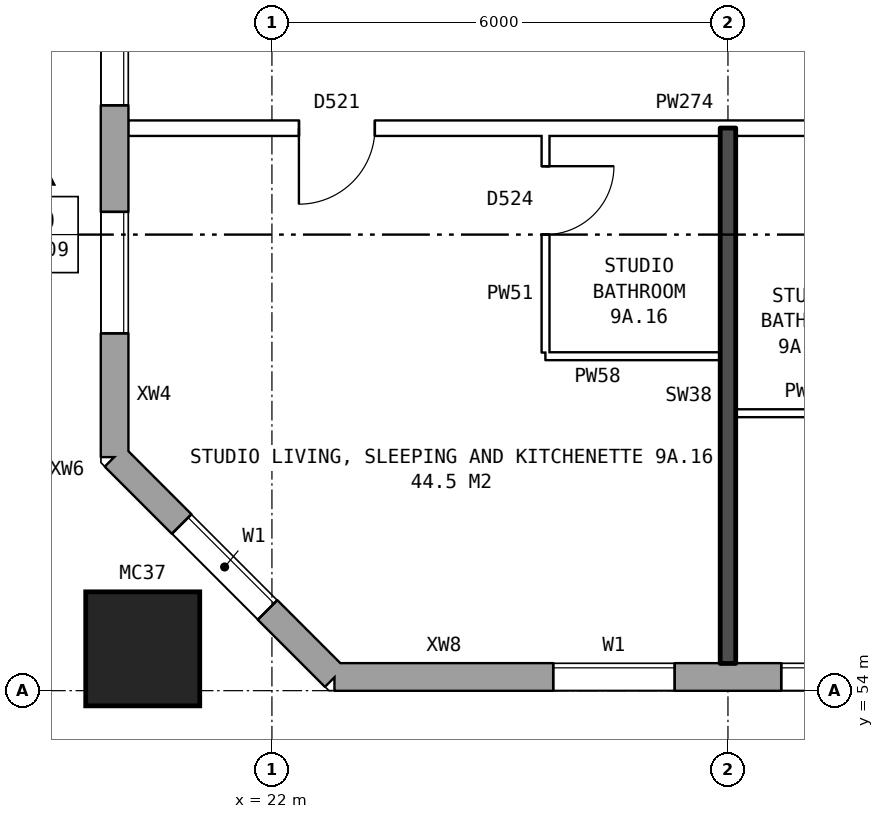
"""IFC4 building model, lengths in metres.
Left out: names, types, materials, properties, quantities, classifications, styles, units other than length and angle.
Written with IfcOpenShell. Run it as: python <this file> out.ifc"""

import sys

from ifc_helpers import new_model, si_unit, direction, frame, frame_2d, origin, origin_2d, place, context, subcontext, project, spatial, rectangle, hollow_rectangle, extrude, element, fill, save


model = new_model("IFC4")
c1 = context("Model", 3, precision=1e-05, world=origin(), true_north=direction((0.0, 1.0)))
c2 = subcontext(c1, "Body", "Model", "MODEL_VIEW")
j1 = project(units=[si_unit("LENGTHUNIT", "METRE"), si_unit("PLANEANGLEUNIT", "RADIAN")], contexts=[c1])
p1 = place(None, origin())
s1 = spatial("IfcSite", under=j1, at=p1, CompositionType="ELEMENT")
p2 = place(p1, origin())
s2 = spatial("IfcBuilding", under=s1, at=p2, CompositionType="ELEMENT")
p3 = place(p2, frame((0.0, 0.0, 35.0)))
s3 = spatial("IfcBuildingStorey", under=s2, at=p3, CompositionType="ELEMENT", Elevation=35.0)
p4 = place(p3, frame((20.3, 54.55, 0.0), z_axis=(0.0, 0.0, 1.0), x_axis=(1.0, 0.0, 0.0)))
e1 = element("IfcColumn", 1, at=p4, inside=s3, PredefinedType="COLUMN", context=c2, shape_type="SweptSolid", body=[
    extrude(hollow_rectangle(XDim=1.5, YDim=1.5, WallThickness=0.08, at=origin_2d()), origin(), (0.0, 0.0, 1.0), 3.1),
])
p5 = place(p3, frame((19.93, 57.075, 0.0), z_axis=(0.0, 0.0, 1.0), x_axis=(0.707106781187, -0.707106781187, 0.0)))
e2 = element("IfcWall", 2, at=p5, inside=s3, PredefinedType="STANDARD", context=c2, shape_type="SweptSolid", body=[
    extrude(rectangle(XDim=4.094, YDim=0.36, at=frame_2d((2.047, 0.0))), origin(), (0.0, 0.0, 1.0), 2.85),
])
p6 = place(p5, frame((1.247, 0.0, 0.8)))
e3 = element("IfcOpeningElement", 3, at=p6, cuts=e2, PredefinedType="OPENING", context=c2, shape_type="SweptSolid", body=[
    extrude(rectangle(XDim=1.6, YDim=1.8, at=frame_2d((0.8, 0.9))), frame((0.0, 0.19, 0.0), z_axis=(0.0, -1.0, 0.0), x_axis=(1.0, 0.0, 0.0)), (0.0, 0.0, 1.0), 0.38),
])
p7 = place(p3, frame((22.825, 54.18, 0.0), z_axis=(0.0, 0.0, 1.0), x_axis=(1.0, 0.0, 0.0)))
e4 = element("IfcWall", 4, at=p7, inside=s3, PredefinedType="STANDARD", context=c2, shape_type="SweptSolid", body=[
    extrude(rectangle(XDim=50.101, YDim=0.36, at=frame_2d((25.05, 0.0))), origin(), (0.0, 0.0, 1.0), 2.85),
])
p8 = place(p7, frame((2.875, 0.0, 0.8)))
e5 = element("IfcOpeningElement", 5, at=p8, cuts=e4, PredefinedType="OPENING", context=c2, shape_type="SweptSolid", body=[
    extrude(rectangle(XDim=1.6, YDim=1.8, at=frame_2d((0.8, 0.9))), frame((0.0, 0.19, 0.0), z_axis=(0.0, -1.0, 0.0), x_axis=(1.0, 0.0, 0.0)), (0.0, 0.0, 1.0), 0.38),
])
p9 = place(p7, frame((5.875, 0.0, 0.8)))
e6 = element("IfcOpeningElement", 6, at=p9, cuts=e4, PredefinedType="OPENING", context=c2, shape_type="SweptSolid", body=[
    extrude(rectangle(XDim=1.6, YDim=1.8, at=frame_2d((0.8, 0.9))), frame((0.0, 0.19, 0.0), z_axis=(0.0, -1.0, 0.0), x_axis=(1.0, 0.0, 0.0)), (0.0, 0.0, 1.0), 0.38),
])
p10 = place(p7, frame((8.875, 0.0, 0.8)))
e7 = element("IfcOpeningElement", 7, at=p10, cuts=e4, PredefinedType="OPENING", context=c2, shape_type="SweptSolid", body=[
    extrude(rectangle(XDim=1.6, YDim=1.8, at=frame_2d((0.8, 0.9))), frame((0.0, 0.19, 0.0), z_axis=(0.0, -1.0, 0.0), x_axis=(1.0, 0.0, 0.0)), (0.0, 0.0, 1.0), 0.38),
])
p11 = place(p7, frame((11.875, 0.0, 0.8)))
e8 = element("IfcOpeningElement", 8, at=p11, cuts=e4, PredefinedType="OPENING", context=c2, shape_type="SweptSolid", body=[
    extrude(rectangle(XDim=1.6, YDim=1.8, at=frame_2d((0.8, 0.9))), frame((0.0, 0.19, 0.0), z_axis=(0.0, -1.0, 0.0), x_axis=(1.0, 0.0, 0.0)), (0.0, 0.0, 1.0), 0.38),
])
p12 = place(p7, frame((14.875, 0.0, 0.8)))
e9 = element("IfcOpeningElement", 9, at=p12, cuts=e4, PredefinedType="OPENING", context=c2, shape_type="SweptSolid", body=[
    extrude(rectangle(XDim=1.6, YDim=1.8, at=frame_2d((0.8, 0.9))), frame((0.0, 0.19, 0.0), z_axis=(0.0, -1.0, 0.0), x_axis=(1.0, 0.0, 0.0)), (0.0, 0.0, 1.0), 0.38),
])
p13 = place(p7, frame((17.875, 0.0, 0.8)))
e10 = element("IfcOpeningElement", 10, at=p13, cuts=e4, PredefinedType="OPENING", context=c2, shape_type="SweptSolid", body=[
    extrude(rectangle(XDim=1.6, YDim=1.8, at=frame_2d((0.8, 0.9))), frame((0.0, 0.19, 0.0), z_axis=(0.0, -1.0, 0.0), x_axis=(1.0, 0.0, 0.0)), (0.0, 0.0, 1.0), 0.38),
])
p14 = place(p7, frame((19.775, 0.0, 0.8)))
e11 = element("IfcOpeningElement", 11, at=p14, cuts=e4, PredefinedType="OPENING", context=c2, shape_type="SweptSolid", body=[
    extrude(rectangle(XDim=1.6, YDim=1.8, at=frame_2d((0.8, 0.9))), frame((0.0, 0.19, 0.0), z_axis=(0.0, -1.0, 0.0), x_axis=(1.0, 0.0, 0.0)), (0.0, 0.0, 1.0), 0.38),
])
p15 = place(p7, frame((23.375, 0.0, 0.15)))
e12 = element("IfcOpeningElement", 12, at=p15, cuts=e4, PredefinedType="OPENING", context=c2, shape_type="SweptSolid", body=[
    extrude(rectangle(XDim=0.6, YDim=0.9, at=frame_2d((0.3, 0.45))), frame((0.0, 0.19, 0.0), z_axis=(0.0, -1.0, 0.0), x_axis=(1.0, 0.0, 0.0)), (0.0, 0.0, 1.0), 0.38),
])
p16 = place(p7, frame((27.275, 0.0, 1.7)))
e13 = element("IfcOpeningElement", 13, at=p16, cuts=e4, PredefinedType="OPENING", context=c2, shape_type="SweptSolid", body=[
    extrude(rectangle(XDim=0.6, YDim=0.9, at=frame_2d((0.3, 0.45))), frame((0.0, 0.19, 0.0), z_axis=(0.0, -1.0, 0.0), x_axis=(1.0, 0.0, 0.0)), (0.0, 0.0, 1.0), 0.38),
])
p17 = place(p7, frame((29.875, 0.0, 0.8)))
e14 = element("IfcOpeningElement", 14, at=p17, cuts=e4, PredefinedType="OPENING", context=c2, shape_type="SweptSolid", body=[
    extrude(rectangle(XDim=1.6, YDim=1.8, at=frame_2d((0.8, 0.9))), frame((0.0, 0.19, 0.0), z_axis=(0.0, -1.0, 0.0), x_axis=(1.0, 0.0, 0.0)), (0.0, 0.0, 1.0), 0.38),
])
p18 = place(p7, frame((32.875, 0.0, 0.8)))
e15 = element("IfcOpeningElement", 15, at=p18, cuts=e4, PredefinedType="OPENING", context=c2, shape_type="SweptSolid", body=[
    extrude(rectangle(XDim=1.6, YDim=1.8, at=frame_2d((0.8, 0.9))), frame((0.0, 0.19, 0.0), z_axis=(0.0, -1.0, 0.0), x_axis=(1.0, 0.0, 0.0)), (0.0, 0.0, 1.0), 0.38),
])
p19 = place(p7, frame((35.875, 0.0, 0.8)))
e16 = element("IfcOpeningElement", 16, at=p19, cuts=e4, PredefinedType="OPENING", context=c2, shape_type="SweptSolid", body=[
    extrude(rectangle(XDim=1.6, YDim=1.8, at=frame_2d((0.8, 0.9))), frame((0.0, 0.19, 0.0), z_axis=(0.0, -1.0, 0.0), x_axis=(1.0, 0.0, 0.0)), (0.0, 0.0, 1.0), 0.38),
])
p20 = place(p7, frame((38.875, 0.0, 0.8)))
e17 = element("IfcOpeningElement", 17, at=p20, cuts=e4, PredefinedType="OPENING", context=c2, shape_type="SweptSolid", body=[
    extrude(rectangle(XDim=1.6, YDim=1.8, at=frame_2d((0.8, 0.9))), frame((0.0, 0.19, 0.0), z_axis=(0.0, -1.0, 0.0), x_axis=(1.0, 0.0, 0.0)), (0.0, 0.0, 1.0), 0.38),
])
p21 = place(p7, frame((41.875, 0.0, 0.8)))
e18 = element("IfcOpeningElement", 18, at=p21, cuts=e4, PredefinedType="OPENING", context=c2, shape_type="SweptSolid", body=[
    extrude(rectangle(XDim=1.6, YDim=1.8, at=frame_2d((0.8, 0.9))), frame((0.0, 0.19, 0.0), z_axis=(0.0, -1.0, 0.0), x_axis=(1.0, 0.0, 0.0)), (0.0, 0.0, 1.0), 0.38),
])
p22 = place(p7, frame((44.875, 0.0, 0.8)))
e19 = element("IfcOpeningElement", 19, at=p22, cuts=e4, PredefinedType="OPENING", context=c2, shape_type="SweptSolid", body=[
    extrude(rectangle(XDim=1.6, YDim=1.8, at=frame_2d((0.8, 0.9))), frame((0.0, 0.19, 0.0), z_axis=(0.0, -1.0, 0.0), x_axis=(1.0, 0.0, 0.0)), (0.0, 0.0, 1.0), 0.38),
])
p23 = place(p7, frame((47.875, 0.0, 0.8)))
e20 = element("IfcOpeningElement", 20, at=p23, cuts=e4, PredefinedType="OPENING", context=c2, shape_type="SweptSolid", body=[
    extrude(rectangle(XDim=1.6, YDim=1.8, at=frame_2d((0.8, 0.9))), frame((0.0, 0.19, 0.0), z_axis=(0.0, -1.0, 0.0), x_axis=(1.0, 0.0, 0.0)), (0.0, 0.0, 1.0), 0.38),
])
p24 = place(p7, frame((21.675, 0.0, 1.4)))
e21 = element("IfcOpeningElement", 21, at=p24, cuts=e4, PredefinedType="OPENING", context=c2, shape_type="SweptSolid", body=[
    extrude(rectangle(XDim=0.6, YDim=1.2, at=frame_2d((0.3, 0.6))), frame((0.0, 0.19, 0.0), z_axis=(0.0, -1.0, 0.0), x_axis=(1.0, 0.0, 0.0)), (0.0, 0.0, 1.0), 0.38),
])
p25 = place(p7, frame((24.275, 0.0, 0.15)))
e22 = element("IfcOpeningElement", 22, at=p25, cuts=e4, PredefinedType="OPENING", context=c2, shape_type="SweptSolid", body=[
    extrude(rectangle(XDim=1.6, YDim=1.5, at=frame_2d((0.8, 0.75))), frame((0.0, 0.19, 0.0), z_axis=(0.0, -1.0, 0.0), x_axis=(1.0, 0.0, 0.0)), (0.0, 0.0, 1.0), 0.38),
])
p26 = place(p7, frame((28.175, 0.0, 1.1)))
e23 = element("IfcOpeningElement", 23, at=p26, cuts=e4, PredefinedType="OPENING", context=c2, shape_type="SweptSolid", body=[
    extrude(rectangle(XDim=0.8, YDim=1.5, at=frame_2d((0.4, 0.75))), frame((0.0, 0.19, 0.0), z_axis=(0.0, -1.0, 0.0), x_axis=(1.0, 0.0, 0.0)), (0.0, 0.0, 1.0), 0.38),
])
p27 = place(p3, frame((19.93, 82.925, 0.0), z_axis=(0.0, 0.0, 1.0), x_axis=(0.0, -1.0, 0.0)))
e24 = element("IfcWall", 24, at=p27, inside=s3, PredefinedType="STANDARD", context=c2, shape_type="SweptSolid", body=[
    extrude(rectangle(XDim=25.851, YDim=0.36, at=frame_2d((12.925, 0.0))), origin(), (0.0, 0.0, 1.0), 2.85),
])
p28 = place(p27, frame((1.625, 0.0, 0.8)))
e25 = element("IfcOpeningElement", 25, at=p28, cuts=e24, PredefinedType="OPENING", context=c2, shape_type="SweptSolid", body=[
    extrude(rectangle(XDim=1.6, YDim=1.8, at=frame_2d((0.8, 0.9))), frame((0.0, 0.19, 0.0), z_axis=(0.0, -1.0, 0.0), x_axis=(1.0, 0.0, 0.0)), (0.0, 0.0, 1.0), 0.38),
])
p29 = place(p27, frame((4.625, 0.0, 0.8)))
e26 = element("IfcOpeningElement", 26, at=p29, cuts=e24, PredefinedType="OPENING", context=c2, shape_type="SweptSolid", body=[
    extrude(rectangle(XDim=1.6, YDim=1.8, at=frame_2d((0.8, 0.9))), frame((0.0, 0.19, 0.0), z_axis=(0.0, -1.0, 0.0), x_axis=(1.0, 0.0, 0.0)), (0.0, 0.0, 1.0), 0.38),
])
p30 = place(p27, frame((7.625, 0.0, 0.8)))
e27 = element("IfcOpeningElement", 27, at=p30, cuts=e24, PredefinedType="OPENING", context=c2, shape_type="SweptSolid", body=[
    extrude(rectangle(XDim=1.6, YDim=1.8, at=frame_2d((0.8, 0.9))), frame((0.0, 0.19, 0.0), z_axis=(0.0, -1.0, 0.0), x_axis=(1.0, 0.0, 0.0)), (0.0, 0.0, 1.0), 0.38),
])
p31 = place(p27, frame((10.625, 0.0, 0.8)))
e28 = element("IfcOpeningElement", 28, at=p31, cuts=e24, PredefinedType="OPENING", context=c2, shape_type="SweptSolid", body=[
    extrude(rectangle(XDim=1.6, YDim=1.8, at=frame_2d((0.8, 0.9))), frame((0.0, 0.19, 0.0), z_axis=(0.0, -1.0, 0.0), x_axis=(1.0, 0.0, 0.0)), (0.0, 0.0, 1.0), 0.38),
])
p32 = place(p27, frame((13.625, 0.0, 0.8)))
e29 = element("IfcOpeningElement", 29, at=p32, cuts=e24, PredefinedType="OPENING", context=c2, shape_type="SweptSolid", body=[
    extrude(rectangle(XDim=1.6, YDim=1.8, at=frame_2d((0.8, 0.9))), frame((0.0, 0.19, 0.0), z_axis=(0.0, -1.0, 0.0), x_axis=(1.0, 0.0, 0.0)), (0.0, 0.0, 1.0), 0.38),
])
p33 = place(p27, frame((16.625, 0.0, 0.8)))
e30 = element("IfcOpeningElement", 30, at=p33, cuts=e24, PredefinedType="OPENING", context=c2, shape_type="SweptSolid", body=[
    extrude(rectangle(XDim=1.6, YDim=1.8, at=frame_2d((0.8, 0.9))), frame((0.0, 0.19, 0.0), z_axis=(0.0, -1.0, 0.0), x_axis=(1.0, 0.0, 0.0)), (0.0, 0.0, 1.0), 0.38),
])
p34 = place(p27, frame((19.625, 0.0, 0.8)))
e31 = element("IfcOpeningElement", 31, at=p34, cuts=e24, PredefinedType="OPENING", context=c2, shape_type="SweptSolid", body=[
    extrude(rectangle(XDim=1.6, YDim=1.8, at=frame_2d((0.8, 0.9))), frame((0.0, 0.19, 0.0), z_axis=(0.0, -1.0, 0.0), x_axis=(1.0, 0.0, 0.0)), (0.0, 0.0, 1.0), 0.38),
])
p35 = place(p27, frame((22.625, 0.0, 0.8)))
e32 = element("IfcOpeningElement", 32, at=p35, cuts=e24, PredefinedType="OPENING", context=c2, shape_type="SweptSolid", body=[
    extrude(rectangle(XDim=1.6, YDim=1.8, at=frame_2d((0.8, 0.9))), frame((0.0, 0.19, 0.0), z_axis=(0.0, -1.0, 0.0), x_axis=(1.0, 0.0, 0.0)), (0.0, 0.0, 1.0), 0.38),
])
p36 = place(p3, frame((28.1, 57.65, 0.0), z_axis=(0.0, 0.0, 1.0), x_axis=(1.0, 0.0, 0.0)))
e33 = element("IfcWall", 33, at=p36, inside=s3, PredefinedType="PARTITIONING", context=c2, shape_type="SweptSolid", body=[
    extrude(rectangle(XDim=1.9, YDim=0.1, at=frame_2d((0.95, 0.0))), origin(), (0.0, 0.0, 1.0), 2.85),
])
p37 = place(p3, frame((25.6, 58.4, 0.0), z_axis=(0.0, 0.0, 1.0), x_axis=(1.0, 0.0, 0.0)))
e34 = element("IfcWall", 34, at=p37, inside=s3, PredefinedType="PARTITIONING", context=c2, shape_type="SweptSolid", body=[
    extrude(rectangle(XDim=2.3, YDim=0.1, at=frame_2d((1.15, 0.0))), origin(), (0.0, 0.0, 1.0), 2.85),
])
p38 = place(p3, frame((20.11, 61.4, 0.0), z_axis=(0.0, 0.0, 1.0), x_axis=(1.0, 0.0, 0.0)))
e35 = element("IfcWall", 35, at=p38, inside=s3, PredefinedType="PARTITIONING", context=c2, shape_type="SweptSolid", body=[
    extrude(rectangle(XDim=25.79, YDim=0.2, at=frame_2d((12.895, 0.0))), origin(), (0.0, 0.0, 1.0), 2.85),
])
p39 = place(p38, frame((23.34, 0.0, 0.0)))
e36 = element("IfcOpeningElement", 36, at=p39, cuts=e35, PredefinedType="OPENING", context=c2, shape_type="SweptSolid", body=[
    extrude(rectangle(XDim=1.0, YDim=2.1, at=frame_2d((0.5, 1.05))), frame((0.0, 0.11, 0.0), z_axis=(0.0, -1.0, 0.0), x_axis=(1.0, 0.0, 0.0)), (0.0, 0.0, 1.0), 0.22),
])
p40 = place(p38, frame((17.39, 0.0, 0.0)))
e37 = element("IfcOpeningElement", 37, at=p40, cuts=e35, PredefinedType="OPENING", context=c2, shape_type="SweptSolid", body=[
    extrude(rectangle(XDim=1.0, YDim=2.1, at=frame_2d((0.5, 1.05))), frame((0.0, 0.11, 0.0), z_axis=(0.0, -1.0, 0.0), x_axis=(1.0, 0.0, 0.0)), (0.0, 0.0, 1.0), 0.22),
])
p41 = place(p38, frame((11.39, 0.0, 0.0)))
e38 = element("IfcOpeningElement", 38, at=p41, cuts=e35, PredefinedType="OPENING", context=c2, shape_type="SweptSolid", body=[
    extrude(rectangle(XDim=1.0, YDim=2.1, at=frame_2d((0.5, 1.05))), frame((0.0, 0.11, 0.0), z_axis=(0.0, -1.0, 0.0), x_axis=(1.0, 0.0, 0.0)), (0.0, 0.0, 1.0), 0.22),
])
p42 = place(p38, frame((2.245, 0.0, 0.0)))
e39 = element("IfcOpeningElement", 39, at=p42, cuts=e35, PredefinedType="OPENING", context=c2, shape_type="SweptSolid", body=[
    extrude(rectangle(XDim=1.0, YDim=2.1, at=frame_2d((0.5, 1.05))), frame((0.0, 0.11, 0.0), z_axis=(0.0, -1.0, 0.0), x_axis=(1.0, 0.0, 0.0)), (0.0, 0.0, 1.0), 0.22),
])
p43 = place(p3, frame((25.6, 58.45, 0.0), z_axis=(0.0, 0.0, 1.0), x_axis=(0.0, 1.0, 0.0)))
e40 = element("IfcWall", 40, at=p43, inside=s3, PredefinedType="PARTITIONING", context=c2, shape_type="SweptSolid", body=[
    extrude(rectangle(XDim=2.85, YDim=0.1, at=frame_2d((1.425, 0.0))), origin(), (0.0, 0.0, 1.0), 2.85),
])
p44 = place(p43, frame((1.55, 0.0, 0.0)))
e41 = element("IfcOpeningElement", 41, at=p44, cuts=e40, PredefinedType="OPENING", context=c2, shape_type="SweptSolid", body=[
    extrude(rectangle(XDim=0.9, YDim=2.1, at=frame_2d((0.45, 1.05))), frame((0.0, 0.06, 0.0), z_axis=(0.0, -1.0, 0.0), x_axis=(1.0, 0.0, 0.0)), (0.0, 0.0, 1.0), 0.12),
])
p45 = place(p3, frame((28.0, 54.36, 0.0), z_axis=(0.0, 0.0, 1.0), x_axis=(0.0, 1.0, 0.0)))
e42 = element("IfcWall", 42, at=p45, inside=s3, PredefinedType="SOLIDWALL", context=c2, shape_type="SweptSolid", body=[
    extrude(rectangle(XDim=7.04, YDim=0.2, at=frame_2d((3.52, 0.0))), origin(), (0.0, 0.0, 1.0), 2.85),
])
p46 = place(p6, origin())
e43 = element("IfcWindow", 43, at=p46, inside=s3, PartitioningType="SINGLE_PANEL", PredefinedType="WINDOW", context=c2, shape_type="SweptSolid", body=[
    extrude(rectangle(XDim=1.6, YDim=1.8, at=frame_2d((0.8, 0.9))), frame((0.0, 0.15, 0.0), z_axis=(0.0, -1.0, 0.0), x_axis=(1.0, 0.0, 0.0)), (0.0, 0.0, 1.0), 0.06),
])
fill(e3, e43)
p47 = place(p8, origin())
e44 = element("IfcWindow", 44, at=p47, inside=s3, PartitioningType="SINGLE_PANEL", PredefinedType="WINDOW", context=c2, shape_type="SweptSolid", body=[
    extrude(rectangle(XDim=1.6, YDim=1.8, at=frame_2d((0.8, 0.9))), frame((0.0, 0.15, 0.0), z_axis=(0.0, -1.0, 0.0), x_axis=(1.0, 0.0, 0.0)), (0.0, 0.0, 1.0), 0.06),
])
fill(e5, e44)
p48 = place(p9, origin())
e45 = element("IfcWindow", 45, at=p48, inside=s3, PartitioningType="SINGLE_PANEL", PredefinedType="WINDOW", context=c2, shape_type="SweptSolid", body=[
    extrude(rectangle(XDim=1.6, YDim=1.8, at=frame_2d((0.8, 0.9))), frame((0.0, 0.15, 0.0), z_axis=(0.0, -1.0, 0.0), x_axis=(1.0, 0.0, 0.0)), (0.0, 0.0, 1.0), 0.06),
])
fill(e6, e45)
p49 = place(p34, origin())
e46 = element("IfcWindow", 46, at=p49, inside=s3, PartitioningType="SINGLE_PANEL", PredefinedType="WINDOW", context=c2, shape_type="SweptSolid", body=[
    extrude(rectangle(XDim=1.6, YDim=1.8, at=frame_2d((0.8, 0.9))), frame((0.0, 0.15, 0.0), z_axis=(0.0, -1.0, 0.0), x_axis=(1.0, 0.0, 0.0)), (0.0, 0.0, 1.0), 0.06),
])
fill(e31, e46)
p50 = place(p35, origin())
e47 = element("IfcWindow", 47, at=p50, inside=s3, PartitioningType="SINGLE_PANEL", PredefinedType="WINDOW", context=c2, shape_type="SweptSolid", body=[
    extrude(rectangle(XDim=1.6, YDim=1.8, at=frame_2d((0.8, 0.9))), frame((0.0, 0.15, 0.0), z_axis=(0.0, -1.0, 0.0), x_axis=(1.0, 0.0, 0.0)), (0.0, 0.0, 1.0), 0.06),
])
fill(e32, e47)
p51 = place(p42, frame((1.0, 0.0, 0.0), z_axis=(0.0, 0.0, 1.0), x_axis=(-1.0, 0.0, 0.0)))
e48 = element("IfcDoor", 48, at=p51, inside=s3, OperationType="SINGLE_SWING_RIGHT", PredefinedType="DOOR", context=c2, shape_type="SweptSolid", body=[
    extrude(rectangle(XDim=1.0, YDim=2.1, at=frame_2d((0.5, 1.05))), frame((0.0, 0.025, 0.0), z_axis=(0.0, -1.0, 0.0), x_axis=(1.0, 0.0, 0.0)), (0.0, 0.0, 1.0), 0.05),
])
fill(e39, e48)
p52 = place(p44, frame((0.9, 0.0, 0.0), z_axis=(0.0, 0.0, 1.0), x_axis=(-1.0, 0.0, 0.0)))
e49 = element("IfcDoor", 49, at=p52, inside=s3, OperationType="SINGLE_SWING_LEFT", PredefinedType="DOOR", context=c2, shape_type="SweptSolid", body=[
    extrude(rectangle(XDim=0.9, YDim=2.1, at=frame_2d((0.45, 1.05))), frame((0.0, 0.025, 0.0), z_axis=(0.0, -1.0, 0.0), x_axis=(1.0, 0.0, 0.0)), (0.0, 0.0, 1.0), 0.05),
])
fill(e41, e49)
save(model, sys.argv[1])
